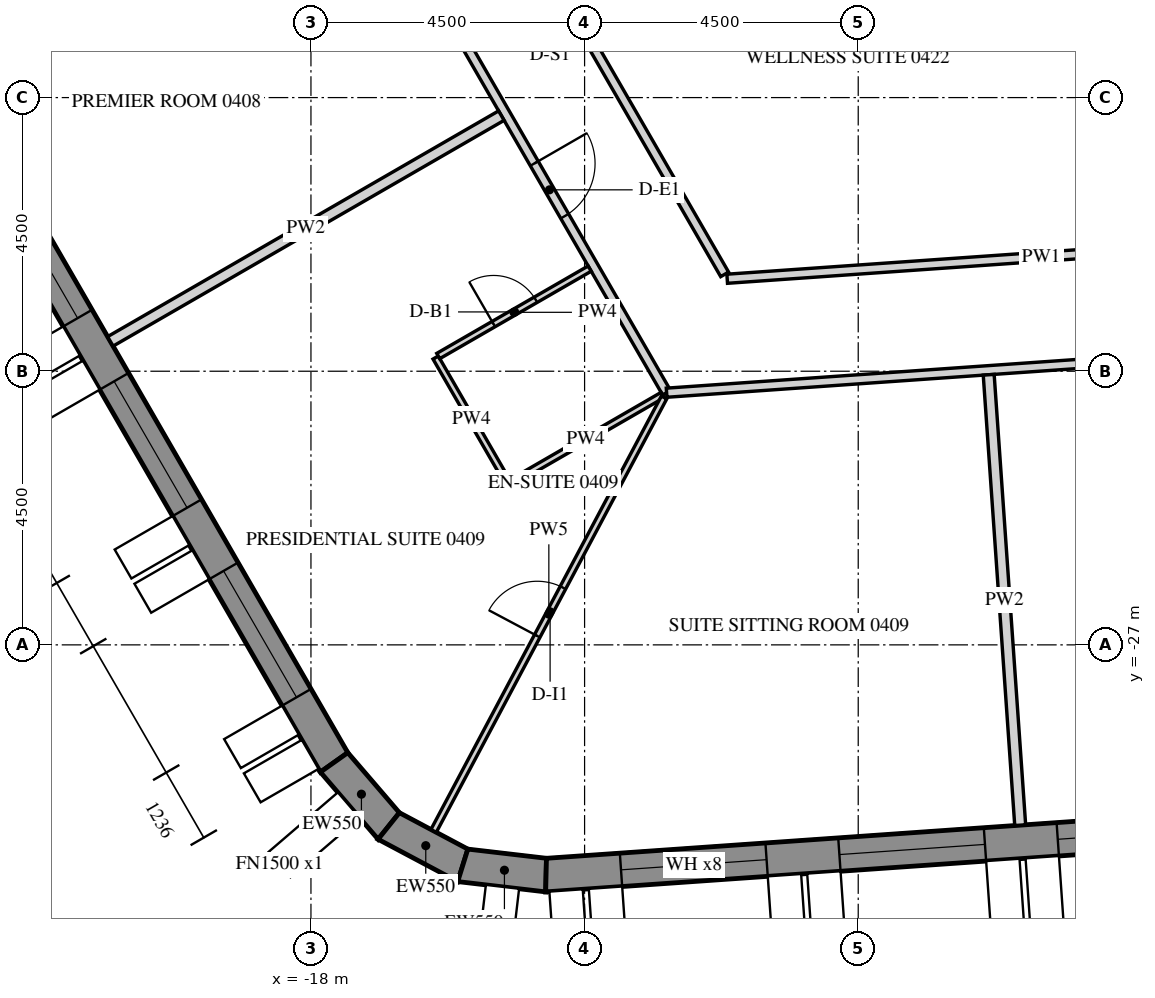
"""IFC4 building model, lengths in metres.
Left out: names, types, materials, properties, quantities, classifications, styles, units other than length and angle.
Written with IfcOpenShell. Run it as: python <this file> out.ifc"""

import sys

from ifc_helpers import new_model, si_unit, direction, frame, frame_2d, origin, place, context, subcontext, project, spatial, polyline, rectangle, outline, extrude, element, fill, save


model = new_model("IFC4")
c1 = context("Model", 3, precision=1e-05, world=origin(), true_north=direction((0.0, 1.0)))
c2 = subcontext(c1, "Body", "Model", "MODEL_VIEW")
j1 = project(units=[si_unit("LENGTHUNIT", "METRE"), si_unit("PLANEANGLEUNIT", "RADIAN")], contexts=[c1])
p1 = place(None, origin())
s1 = spatial("IfcSite", under=j1, at=p1, CompositionType="ELEMENT")
p2 = place(p1, origin())
s2 = spatial("IfcBuilding", under=s1, at=p2, CompositionType="ELEMENT")
p3 = place(p2, frame((0.0, 0.0, 68.7)))
s3 = spatial("IfcBuildingStorey", under=s2, at=p3, CompositionType="ELEMENT", Elevation=68.7)
p4 = place(p3, frame((-32.655, -2.89, -0.15), z_axis=(0.0, 0.0, 1.0), x_axis=(0.499997711317, -0.866026725152, 0.0)))
e1 = element("IfcWall", 1, at=p4, inside=s3, PredefinedType="SOLIDWALL", context=c2, shape_type="SweptSolid", body=[
    extrude(outline(polyline([(-0.022, -0.275), (30.097, -0.275), (30.045, 0.275), (0.022, 0.275), (-0.022, -0.275)])), origin(), (0.0, 0.0, 1.0), 3.9),
])
p5 = place(p4, frame((1.236, 0.0, 1.05)))
e2 = element("IfcOpeningElement", 2, at=p5, cuts=e1, PredefinedType="OPENING", context=c2, shape_type="SweptSolid", body=[
    extrude(rectangle(XDim=2.4, YDim=2.4, at=frame_2d((1.2, 1.2))), frame((0.0, 0.285, 0.0), z_axis=(0.0, -1.0, 0.0), x_axis=(1.0, 0.0, 0.0)), (0.0, 0.0, 1.0), 0.57),
])
p6 = place(p4, frame((4.835, 0.0, 1.05)))
e3 = element("IfcOpeningElement", 3, at=p6, cuts=e1, PredefinedType="OPENING", context=c2, shape_type="SweptSolid", body=[
    extrude(rectangle(XDim=2.4, YDim=2.4, at=frame_2d((1.2, 1.2))), frame((0.0, 0.285, 0.0), z_axis=(0.0, -1.0, 0.0), x_axis=(1.0, 0.0, 0.0)), (0.0, 0.0, 1.0), 0.57),
])
p7 = place(p4, frame((8.436, 0.0, 1.05)))
e4 = element("IfcOpeningElement", 4, at=p7, cuts=e1, PredefinedType="OPENING", context=c2, shape_type="SweptSolid", body=[
    extrude(rectangle(XDim=2.4, YDim=2.4, at=frame_2d((1.2, 1.2))), frame((0.0, 0.285, 0.0), z_axis=(0.0, -1.0, 0.0), x_axis=(1.0, 0.0, 0.0)), (0.0, 0.0, 1.0), 0.57),
])
p8 = place(p4, frame((12.035, 0.0, 1.05)))
e5 = element("IfcOpeningElement", 5, at=p8, cuts=e1, PredefinedType="OPENING", context=c2, shape_type="SweptSolid", body=[
    extrude(rectangle(XDim=2.4, YDim=2.4, at=frame_2d((1.2, 1.2))), frame((0.0, 0.285, 0.0), z_axis=(0.0, -1.0, 0.0), x_axis=(1.0, 0.0, 0.0)), (0.0, 0.0, 1.0), 0.57),
])
p9 = place(p4, frame((15.635, 0.0, 1.05)))
e6 = element("IfcOpeningElement", 6, at=p9, cuts=e1, PredefinedType="OPENING", context=c2, shape_type="SweptSolid", body=[
    extrude(rectangle(XDim=2.4, YDim=2.4, at=frame_2d((1.2, 1.2))), frame((0.0, 0.285, 0.0), z_axis=(0.0, -1.0, 0.0), x_axis=(1.0, 0.0, 0.0)), (0.0, 0.0, 1.0), 0.57),
])
p10 = place(p4, frame((19.236, 0.0, 1.05)))
e7 = element("IfcOpeningElement", 7, at=p10, cuts=e1, PredefinedType="OPENING", context=c2, shape_type="SweptSolid", body=[
    extrude(rectangle(XDim=2.4, YDim=2.4, at=frame_2d((1.2, 1.2))), frame((0.0, 0.285, 0.0), z_axis=(0.0, -1.0, 0.0), x_axis=(1.0, 0.0, 0.0)), (0.0, 0.0, 1.0), 0.57),
])
p11 = place(p4, frame((22.835, 0.0, 1.05)))
e8 = element("IfcOpeningElement", 8, at=p11, cuts=e1, PredefinedType="OPENING", context=c2, shape_type="SweptSolid", body=[
    extrude(rectangle(XDim=2.4, YDim=2.4, at=frame_2d((1.2, 1.2))), frame((0.0, 0.285, 0.0), z_axis=(0.0, -1.0, 0.0), x_axis=(1.0, 0.0, 0.0)), (0.0, 0.0, 1.0), 0.57),
])
p12 = place(p4, frame((26.436, 0.0, 1.05)))
e9 = element("IfcOpeningElement", 9, at=p12, cuts=e1, PredefinedType="OPENING", context=c2, shape_type="SweptSolid", body=[
    extrude(rectangle(XDim=2.4, YDim=2.4, at=frame_2d((1.2, 1.2))), frame((0.0, 0.285, 0.0), z_axis=(0.0, -1.0, 0.0), x_axis=(1.0, 0.0, 0.0)), (0.0, 0.0, 1.0), 0.57),
])
p13 = place(p3, frame((-17.619, -28.932, -0.15), z_axis=(0.0, 0.0, 1.0), x_axis=(0.651621950847, -0.758543890078, 0.0)))
e10 = element("IfcWall", 10, at=p13, inside=s3, PredefinedType="SOLIDWALL", context=c2, shape_type="SweptSolid", body=[
    extrude(outline(polyline([(-0.026, -0.275), (1.431, -0.275), (1.327, 0.275), (0.026, 0.275), (-0.026, -0.275)])), origin(), (0.0, 0.0, 1.0), 3.9),
])
p14 = place(p3, frame((-16.721, -29.979, -0.15), z_axis=(0.0, 0.0, 1.0), x_axis=(0.882994189209, -0.469383917304, 0.0)))
e11 = element("IfcWall", 11, at=p14, inside=s3, PredefinedType="SOLIDWALL", context=c2, shape_type="SweptSolid", body=[
    extrude(outline(polyline([(-0.052, -0.275), (1.431, -0.275), (1.327, 0.275), (0.052, 0.275), (-0.052, -0.275)])), origin(), (0.0, 0.0, 1.0), 3.9),
])
p15 = place(p3, frame((-15.503, -30.626, -0.15), z_axis=(0.0, 0.0, 1.0), x_axis=(0.993232537394, -0.11614269956, 0.0)))
e12 = element("IfcWall", 12, at=p15, inside=s3, PredefinedType="SOLIDWALL", context=c2, shape_type="SweptSolid", body=[
    extrude(outline(polyline([(-0.052, -0.275), (1.405, -0.275), (1.353, 0.275), (0.052, 0.275), (-0.052, -0.275)])), origin(), (0.0, 0.0, 1.0), 3.9),
])
p16 = place(p3, frame((-14.134, -30.786, -0.15), z_axis=(0.0, 0.0, 1.0), x_axis=(0.997564037441, 0.069756657061, 0.0)))
e13 = element("IfcWall", 13, at=p16, inside=s3, PredefinedType="SOLIDWALL", context=c2, shape_type="SweptSolid", body=[
    extrude(outline(polyline([(-0.026, -0.275), (30.094, -0.275), (30.049, 0.275), (0.026, 0.275), (-0.026, -0.275)])), origin(), (0.0, 0.0, 1.0), 3.9),
])
p17 = place(p16, frame((1.236, 0.0, 1.05)))
e14 = element("IfcOpeningElement", 14, at=p17, cuts=e13, PredefinedType="OPENING", context=c2, shape_type="SweptSolid", body=[
    extrude(rectangle(XDim=2.4, YDim=2.4, at=frame_2d((1.2, 1.2))), frame((0.0, 0.285, 0.0), z_axis=(0.0, -1.0, 0.0), x_axis=(1.0, 0.0, 0.0)), (0.0, 0.0, 1.0), 0.57),
])
p18 = place(p16, frame((4.835, 0.0, 1.05)))
e15 = element("IfcOpeningElement", 15, at=p18, cuts=e13, PredefinedType="OPENING", context=c2, shape_type="SweptSolid", body=[
    extrude(rectangle(XDim=2.4, YDim=2.4, at=frame_2d((1.2, 1.2))), frame((0.0, 0.285, 0.0), z_axis=(0.0, -1.0, 0.0), x_axis=(1.0, 0.0, 0.0)), (0.0, 0.0, 1.0), 0.57),
])
p19 = place(p16, frame((8.436, 0.0, 1.05)))
e16 = element("IfcOpeningElement", 16, at=p19, cuts=e13, PredefinedType="OPENING", context=c2, shape_type="SweptSolid", body=[
    extrude(rectangle(XDim=2.4, YDim=2.4, at=frame_2d((1.2, 1.2))), frame((0.0, 0.285, 0.0), z_axis=(0.0, -1.0, 0.0), x_axis=(1.0, 0.0, 0.0)), (0.0, 0.0, 1.0), 0.57),
])
p20 = place(p16, frame((12.035, 0.0, 1.05)))
e17 = element("IfcOpeningElement", 17, at=p20, cuts=e13, PredefinedType="OPENING", context=c2, shape_type="SweptSolid", body=[
    extrude(rectangle(XDim=2.4, YDim=2.4, at=frame_2d((1.2, 1.2))), frame((0.0, 0.285, 0.0), z_axis=(0.0, -1.0, 0.0), x_axis=(1.0, 0.0, 0.0)), (0.0, 0.0, 1.0), 0.57),
])
p21 = place(p16, frame((15.635, 0.0, 1.05)))
e18 = element("IfcOpeningElement", 18, at=p21, cuts=e13, PredefinedType="OPENING", context=c2, shape_type="SweptSolid", body=[
    extrude(rectangle(XDim=2.4, YDim=2.4, at=frame_2d((1.2, 1.2))), frame((0.0, 0.285, 0.0), z_axis=(0.0, -1.0, 0.0), x_axis=(1.0, 0.0, 0.0)), (0.0, 0.0, 1.0), 0.57),
])
p22 = place(p16, frame((19.236, 0.0, 1.05)))
e19 = element("IfcOpeningElement", 19, at=p22, cuts=e13, PredefinedType="OPENING", context=c2, shape_type="SweptSolid", body=[
    extrude(rectangle(XDim=2.4, YDim=2.4, at=frame_2d((1.2, 1.2))), frame((0.0, 0.285, 0.0), z_axis=(0.0, -1.0, 0.0), x_axis=(1.0, 0.0, 0.0)), (0.0, 0.0, 1.0), 0.57),
])
p23 = place(p16, frame((22.835, 0.0, 1.05)))
e20 = element("IfcOpeningElement", 20, at=p23, cuts=e13, PredefinedType="OPENING", context=c2, shape_type="SweptSolid", body=[
    extrude(rectangle(XDim=2.4, YDim=2.4, at=frame_2d((1.2, 1.2))), frame((0.0, 0.285, 0.0), z_axis=(0.0, -1.0, 0.0), x_axis=(1.0, 0.0, 0.0)), (0.0, 0.0, 1.0), 0.57),
])
p24 = place(p16, frame((26.436, 0.0, 1.05)))
e21 = element("IfcOpeningElement", 21, at=p24, cuts=e13, PredefinedType="OPENING", context=c2, shape_type="SweptSolid", body=[
    extrude(rectangle(XDim=2.4, YDim=2.4, at=frame_2d((1.2, 1.2))), frame((0.0, 0.285, 0.0), z_axis=(0.0, -1.0, 0.0), x_axis=(1.0, 0.0, 0.0)), (0.0, 0.0, 1.0), 0.57),
])
p25 = place(p3, frame((-24.09, -2.175, 0.0), z_axis=(0.0, 0.0, 1.0), x_axis=(0.499996832073, -0.86602723278, 0.0)))
e22 = element("IfcWall", 22, at=p25, inside=s3, PredefinedType="PARTITIONING", context=c2, shape_type="SweptSolid", body=[
    extrude(rectangle(XDim=23.877, YDim=0.15, at=frame_2d((11.938, 0.0))), origin(), (0.0, 0.0, 1.0), 2.988),
])
p26 = place(p25, frame((3.943, 0.0, 0.0)))
e23 = element("IfcOpeningElement", 23, at=p26, cuts=e22, PredefinedType="OPENING", context=c2, shape_type="SweptSolid", body=[
    extrude(rectangle(XDim=1.0, YDim=2.1, at=frame_2d((0.5, 1.05))), frame((0.0, 0.085, 0.0), z_axis=(0.0, -1.0, 0.0), x_axis=(1.0, 0.0, 0.0)), (0.0, 0.0, 1.0), 0.17),
])
p27 = place(p25, frame((15.672, 0.0, 0.0)))
e24 = element("IfcOpeningElement", 24, at=p27, cuts=e22, PredefinedType="OPENING", context=c2, shape_type="SweptSolid", body=[
    extrude(rectangle(XDim=1.0, YDim=2.1, at=frame_2d((0.5, 1.05))), frame((0.0, 0.085, 0.0), z_axis=(0.0, -1.0, 0.0), x_axis=(1.0, 0.0, 0.0)), (0.0, 0.0, 1.0), 0.17),
])
p28 = place(p25, frame((19.525, 0.0, 0.0)))
e25 = element("IfcOpeningElement", 25, at=p28, cuts=e22, PredefinedType="OPENING", context=c2, shape_type="SweptSolid", body=[
    extrude(rectangle(XDim=1.0, YDim=2.1, at=frame_2d((0.5, 1.05))), frame((0.0, 0.085, 0.0), z_axis=(0.0, -1.0, 0.0), x_axis=(1.0, 0.0, 0.0)), (0.0, 0.0, 1.0), 0.17),
])
p29 = place(p3, frame((-12.151, -22.853, 0.0), z_axis=(0.0, 0.0, 1.0), x_axis=(0.99756425444, 0.069753553767, 0.0)))
e26 = element("IfcWall", 26, at=p29, inside=s3, PredefinedType="PARTITIONING", context=c2, shape_type="SweptSolid", body=[
    extrude(rectangle(XDim=22.085, YDim=0.15, at=frame_2d((11.042, 0.0))), origin(), (0.0, 0.0, 1.0), 2.988),
])
p30 = place(p29, frame((7.205, 0.0, 0.0)))
e27 = element("IfcOpeningElement", 27, at=p30, cuts=e26, PredefinedType="OPENING", context=c2, shape_type="SweptSolid", body=[
    extrude(rectangle(XDim=1.0, YDim=2.1, at=frame_2d((0.5, 1.05))), frame((0.0, 0.085, 0.0), z_axis=(0.0, -1.0, 0.0), x_axis=(1.0, 0.0, 0.0)), (0.0, 0.0, 1.0), 0.17),
])
p31 = place(p29, frame((17.995, 0.0, 0.0)))
e28 = element("IfcOpeningElement", 28, at=p31, cuts=e26, PredefinedType="OPENING", context=c2, shape_type="SweptSolid", body=[
    extrude(rectangle(XDim=1.0, YDim=2.1, at=frame_2d((0.5, 1.05))), frame((0.0, 0.085, 0.0), z_axis=(0.0, -1.0, 0.0), x_axis=(1.0, 0.0, 0.0)), (0.0, 0.0, 1.0), 0.17),
])
p32 = place(p3, frame((-0.825, -20.257, 0.0), z_axis=(0.0, 0.0, 1.0), x_axis=(-0.9975635143, -0.069764137903, 0.0)))
e29 = element("IfcWall", 29, at=p32, inside=s3, PredefinedType="PARTITIONING", context=c2, shape_type="SweptSolid", body=[
    extrude(rectangle(XDim=10.355, YDim=0.15, at=frame_2d((5.177, 0.0))), origin(), (0.0, 0.0, 1.0), 2.988),
])
p33 = place(p3, frame((-11.197, -20.907, 0.0), z_axis=(0.0, 0.0, 1.0), x_axis=(-0.500004557924, 0.86602277225, 0.0)))
e30 = element("IfcWall", 30, at=p33, inside=s3, PredefinedType="PARTITIONING", context=c2, shape_type="SweptSolid", body=[
    extrude(rectangle(XDim=11.487, YDim=0.15, at=frame_2d((5.743, 0.0))), origin(), (0.0, 0.0, 1.0), 2.988),
])
p34 = place(p33, frame((5.293, 0.0, 0.0)))
e31 = element("IfcOpeningElement", 31, at=p34, cuts=e30, PredefinedType="OPENING", context=c2, shape_type="SweptSolid", body=[
    extrude(rectangle(XDim=0.9, YDim=2.1, at=frame_2d((0.45, 1.05))), frame((0.0, 0.085, 0.0), z_axis=(0.0, -1.0, 0.0), x_axis=(1.0, 0.0, 0.0)), (0.0, 0.0, 1.0), 0.17),
])
p35 = place(p3, frame((-21.299, -22.009, 0.0), z_axis=(0.0, 0.0, 1.0), x_axis=(0.866014745021, 0.500018461065, 0.0)))
e32 = element("IfcWall", 32, at=p35, inside=s3, PredefinedType="PARTITIONING", context=c2, shape_type="SweptSolid", body=[
    extrude(rectangle(XDim=7.425, YDim=0.18, at=frame_2d((3.712, 0.0))), origin(), (0.0, 0.0, 1.0), 2.988),
])
p36 = place(p3, frame((-12.216, -22.891, 0.0), z_axis=(0.0, 0.0, 1.0), x_axis=(-0.866046596414, -0.499963291492, 0.0)))
e33 = element("IfcWall", 33, at=p36, inside=s3, PredefinedType="PARTITIONING", context=c2, shape_type="SweptSolid", body=[
    extrude(rectangle(XDim=2.925, YDim=0.1, at=frame_2d((1.462, 0.0))), origin(), (0.0, 0.0, 1.0), 2.988),
])
p37 = place(p3, frame((-14.774, -24.31, 0.0), z_axis=(0.0, 0.0, 1.0), x_axis=(-0.500016218704, 0.866016039709, 0.0)))
e34 = element("IfcWall", 34, at=p37, inside=s3, PredefinedType="PARTITIONING", context=c2, shape_type="SweptSolid", body=[
    extrude(rectangle(XDim=2.35, YDim=0.1, at=frame_2d((1.175, 0.0))), origin(), (0.0, 0.0, 1.0), 2.988),
])
p38 = place(p3, frame((-15.906, -22.25, 0.0), z_axis=(0.0, 0.0, 1.0), x_axis=(0.866018712932, 0.500011588718, 0.0)))
e35 = element("IfcWall", 35, at=p38, inside=s3, PredefinedType="PARTITIONING", context=c2, shape_type="SweptSolid", body=[
    extrude(rectangle(XDim=2.875, YDim=0.1, at=frame_2d((1.438, 0.0))), origin(), (0.0, 0.0, 1.0), 2.988),
])
p39 = place(p38, frame((1.05, 0.0, 0.0)))
e36 = element("IfcOpeningElement", 36, at=p39, cuts=e35, PredefinedType="OPENING", context=c2, shape_type="SweptSolid", body=[
    extrude(rectangle(XDim=0.8, YDim=2.1, at=frame_2d((0.4, 1.05))), frame((0.0, 0.06, 0.0), z_axis=(0.0, -1.0, 0.0), x_axis=(1.0, 0.0, 0.0)), (0.0, 0.0, 1.0), 0.12),
])
p40 = place(p3, frame((-15.983, -30.059, 0.0), z_axis=(0.0, 0.0, 1.0), x_axis=(0.469476547643, 0.882944942346, 0.0)))
e37 = element("IfcWall", 37, at=p40, inside=s3, PredefinedType="PARTITIONING", context=c2, shape_type="SweptSolid", body=[
    extrude(rectangle(XDim=8.073, YDim=0.1, at=frame_2d((4.037, 0.0))), origin(), (0.0, 0.0, 1.0), 2.988),
])
p41 = place(p40, frame((3.631, 0.0, 0.0)))
e38 = element("IfcOpeningElement", 38, at=p41, cuts=e37, PredefinedType="OPENING", context=c2, shape_type="SweptSolid", body=[
    extrude(rectangle(XDim=0.9, YDim=2.1, at=frame_2d((0.45, 1.05))), frame((0.0, 0.06, 0.0), z_axis=(0.0, -1.0, 0.0), x_axis=(1.0, 0.0, 0.0)), (0.0, 0.0, 1.0), 0.12),
])
p42 = place(p3, frame((-6.336, -29.965, 0.0), z_axis=(0.0, 0.0, 1.0), x_axis=(-0.06977252161, 0.997562927954, 0.0)))
e39 = element("IfcWall", 39, at=p42, inside=s3, PredefinedType="PARTITIONING", context=c2, shape_type="SweptSolid", body=[
    extrude(rectangle(XDim=7.425, YDim=0.18, at=frame_2d((3.712, 0.0))), origin(), (0.0, 0.0, 1.0), 2.988),
])
p43 = place(p10, frame((0.0, 0.205, 0.0)))
e40 = element("IfcWindow", 40, at=p43, inside=s3, PartitioningType="DOUBLE_PANEL_VERTICAL", PredefinedType="WINDOW", context=c2, shape_type="SweptSolid", body=[
    extrude(rectangle(XDim=2.4, YDim=2.4, at=frame_2d((1.2, 1.2))), frame((0.0, 0.03, 0.0), z_axis=(0.0, -1.0, 0.0), x_axis=(1.0, 0.0, 0.0)), (0.0, 0.0, 1.0), 0.06),
])
fill(e7, e40)
p44 = place(p11, frame((0.0, 0.205, 0.0)))
e41 = element("IfcWindow", 41, at=p44, inside=s3, PartitioningType="DOUBLE_PANEL_VERTICAL", PredefinedType="WINDOW", context=c2, shape_type="SweptSolid", body=[
    extrude(rectangle(XDim=2.4, YDim=2.4, at=frame_2d((1.2, 1.2))), frame((0.0, 0.03, 0.0), z_axis=(0.0, -1.0, 0.0), x_axis=(1.0, 0.0, 0.0)), (0.0, 0.0, 1.0), 0.06),
])
fill(e8, e41)
p45 = place(p12, frame((0.0, 0.205, 0.0)))
e42 = element("IfcWindow", 42, at=p45, inside=s3, PartitioningType="DOUBLE_PANEL_VERTICAL", PredefinedType="WINDOW", context=c2, shape_type="SweptSolid", body=[
    extrude(rectangle(XDim=2.4, YDim=2.4, at=frame_2d((1.2, 1.2))), frame((0.0, 0.03, 0.0), z_axis=(0.0, -1.0, 0.0), x_axis=(1.0, 0.0, 0.0)), (0.0, 0.0, 1.0), 0.06),
])
fill(e9, e42)
p46 = place(p17, frame((0.0, 0.205, 0.0)))
e43 = element("IfcWindow", 43, at=p46, inside=s3, PartitioningType="DOUBLE_PANEL_VERTICAL", PredefinedType="WINDOW", context=c2, shape_type="SweptSolid", body=[
    extrude(rectangle(XDim=2.4, YDim=2.4, at=frame_2d((1.2, 1.2))), frame((0.0, 0.03, 0.0), z_axis=(0.0, -1.0, 0.0), x_axis=(1.0, 0.0, 0.0)), (0.0, 0.0, 1.0), 0.06),
])
fill(e14, e43)
p47 = place(p18, frame((0.0, 0.205, 0.0)))
e44 = element("IfcWindow", 44, at=p47, inside=s3, PartitioningType="DOUBLE_PANEL_VERTICAL", PredefinedType="WINDOW", context=c2, shape_type="SweptSolid", body=[
    extrude(rectangle(XDim=2.4, YDim=2.4, at=frame_2d((1.2, 1.2))), frame((0.0, 0.03, 0.0), z_axis=(0.0, -1.0, 0.0), x_axis=(1.0, 0.0, 0.0)), (0.0, 0.0, 1.0), 0.06),
])
fill(e15, e44)
p48 = place(p19, frame((0.0, 0.205, 0.0)))
e45 = element("IfcWindow", 45, at=p48, inside=s3, PartitioningType="DOUBLE_PANEL_VERTICAL", PredefinedType="WINDOW", context=c2, shape_type="SweptSolid", body=[
    extrude(rectangle(XDim=2.4, YDim=2.4, at=frame_2d((1.2, 1.2))), frame((0.0, 0.03, 0.0), z_axis=(0.0, -1.0, 0.0), x_axis=(1.0, 0.0, 0.0)), (0.0, 0.0, 1.0), 0.06),
])
fill(e16, e45)
p49 = place(p28, origin())
e46 = element("IfcDoor", 46, at=p49, inside=s3, OperationType="SINGLE_SWING_RIGHT", PredefinedType="DOOR", context=c2, shape_type="SweptSolid", body=[
    extrude(rectangle(XDim=1.0, YDim=2.1, at=frame_2d((0.5, 1.05))), frame((0.0, 0.025, 0.0), z_axis=(0.0, -1.0, 0.0), x_axis=(1.0, 0.0, 0.0)), (0.0, 0.0, 1.0), 0.05),
])
fill(e25, e46)
p50 = place(p39, origin())
e47 = element("IfcDoor", 47, at=p50, inside=s3, OperationType="SINGLE_SWING_LEFT", PredefinedType="DOOR", context=c2, shape_type="SweptSolid", body=[
    extrude(rectangle(XDim=0.8, YDim=2.1, at=frame_2d((0.4, 1.05))), frame((0.0, 0.025, 0.0), z_axis=(0.0, -1.0, 0.0), x_axis=(1.0, 0.0, 0.0)), (0.0, 0.0, 1.0), 0.05),
])
fill(e36, e47)
p51 = place(p41, origin())
e48 = element("IfcDoor", 48, at=p51, inside=s3, OperationType="SINGLE_SWING_LEFT", PredefinedType="DOOR", context=c2, shape_type="SweptSolid", body=[
    extrude(rectangle(XDim=0.9, YDim=2.1, at=frame_2d((0.45, 1.05))), frame((0.0, 0.025, 0.0), z_axis=(0.0, -1.0, 0.0), x_axis=(1.0, 0.0, 0.0)), (0.0, 0.0, 1.0), 0.05),
])
fill(e38, e48)
save(model, sys.argv[1])
